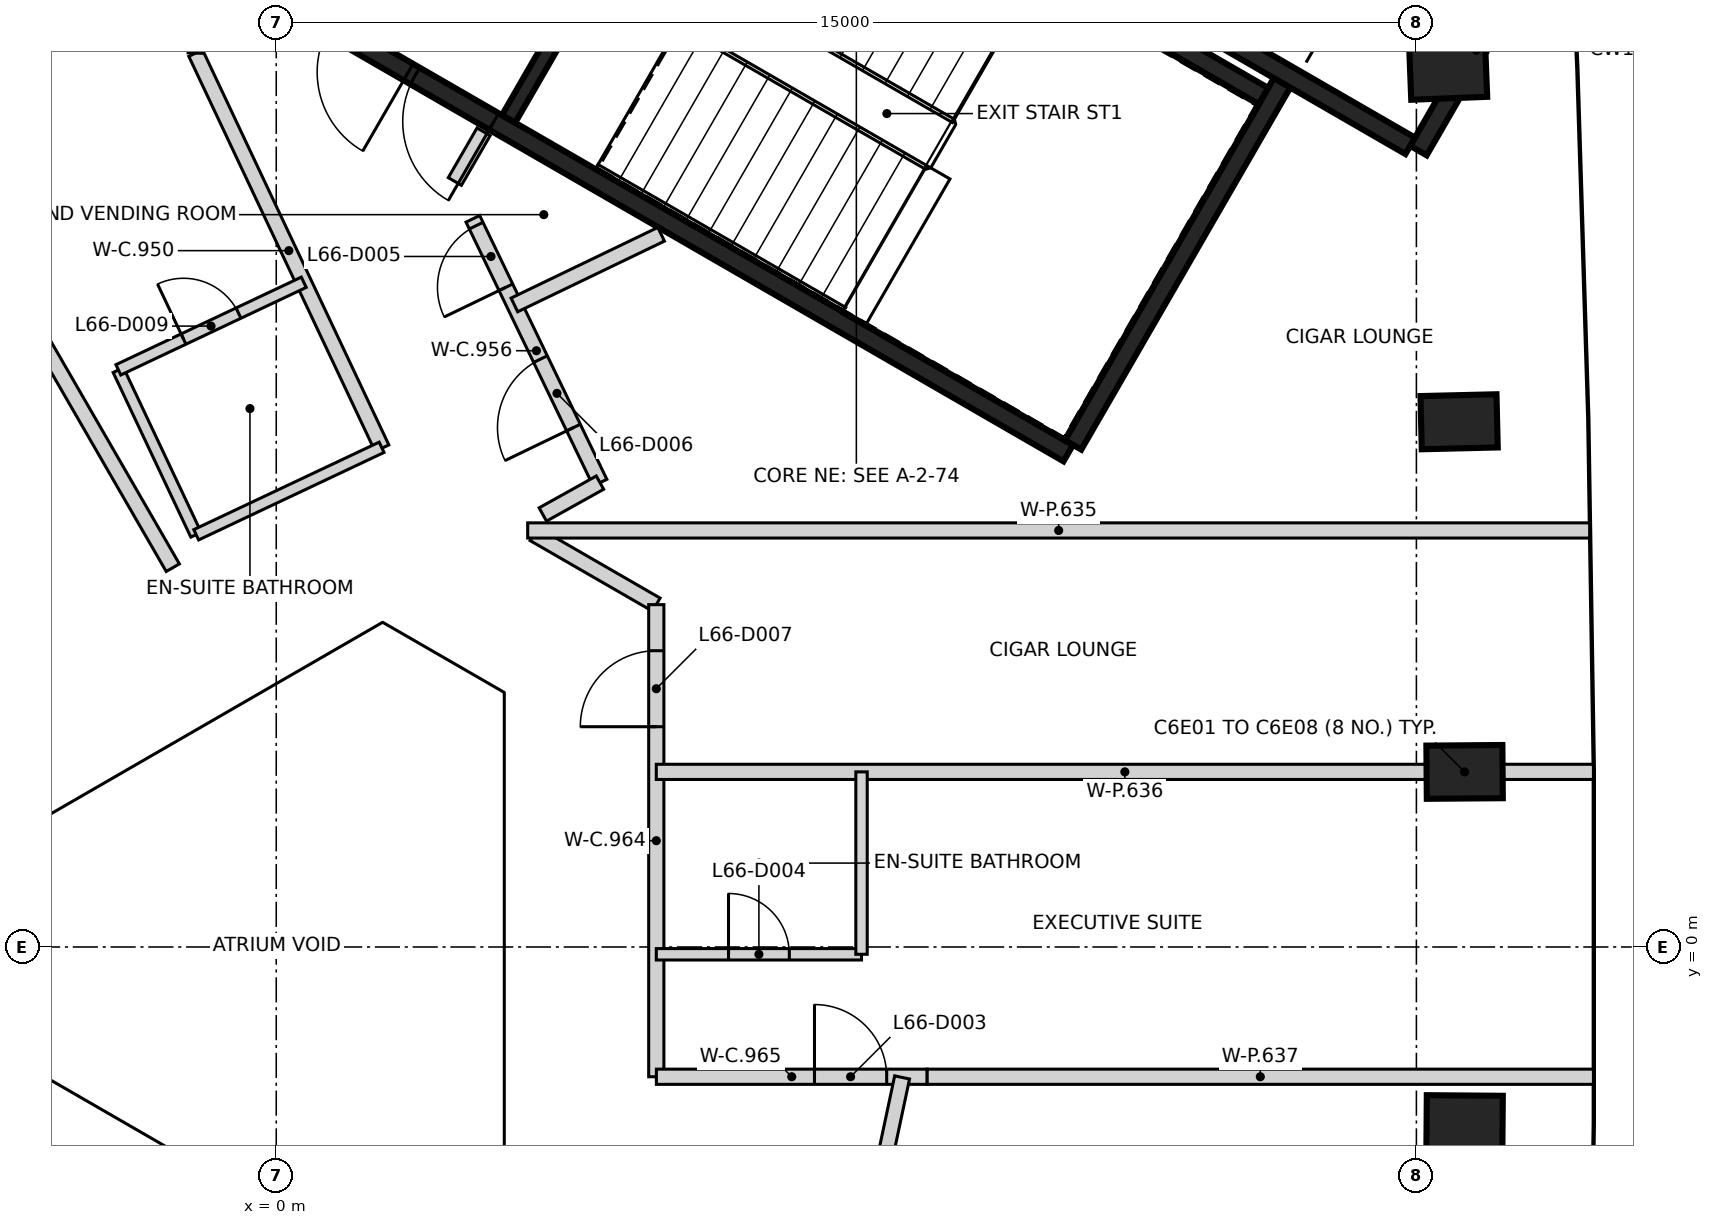
"""IFC4 building model, lengths in metres.
Left out: names, types, materials, properties, quantities, classifications, styles, units other than length and angle.
Written with IfcOpenShell. Run it as: python <this file> out.ifc"""

import sys

from ifc_helpers import new_model, si_unit, direction, frame, frame_2d, origin, origin_2d, place, context, subcontext, project, spatial, rectangle, extrude, element, fill, save


model = new_model("IFC4")
c1 = context("Model", 3, precision=1e-05, world=origin(), true_north=direction((0.0, 1.0)))
c2 = subcontext(c1, "Body", "Model", "MODEL_VIEW")
j1 = project(units=[si_unit("LENGTHUNIT", "METRE"), si_unit("PLANEANGLEUNIT", "RADIAN")], contexts=[c1])
p1 = place(None, origin())
s1 = spatial("IfcSite", under=j1, at=p1, CompositionType="ELEMENT")
p2 = place(p1, origin())
s2 = spatial("IfcBuilding", under=s1, at=p2, CompositionType="ELEMENT")
p3 = place(p2, frame((0.0, 0.0, 262.2)))
s3 = spatial("IfcBuildingStorey", under=s2, at=p3, CompositionType="ELEMENT", Elevation=262.2)
for number, where, z_axis, x_axis in (
    (1, (15.634, -2.303, -0.35), (0.0, 0.0, 1.0), (-1.0, 0.008, 0.0)),
    (2, (15.634, 2.303, -0.35), (0.0, 0.0, 1.0), (1.0, 0.008, 0.0)),
    (3, (15.562, 6.91, -0.35), (0.0, 0.0, 1.0), (1.0, 0.024, 0.0)),
    (4, (15.418, 11.515, -0.35), (0.0, 0.0, 1.0), (0.999, 0.039, 0.0)),
):
    element("IfcColumn", number, at=place(p3, frame(where, z_axis=z_axis, x_axis=x_axis)), inside=s3, PredefinedType="COLUMN", context=c2, shape_type="SweptSolid", body=[
        extrude(rectangle(XDim=1.0, YDim=0.7, at=origin_2d()), origin(), (0.0, 0.0, 1.0), 3.6),
    ])
p4 = place(p3, frame((10.42, 6.498, 0.0), z_axis=(0.0, 0.0, 1.0), x_axis=(-0.866021906294, 0.500006057782, 0.0)))
e5 = element("IfcWall", 5, at=p4, inside=s3, PredefinedType="SHEAR", context=c2, shape_type="SweptSolid", body=[
    extrude(rectangle(XDim=11.55, YDim=0.25, at=frame_2d((5.775, 0.0))), origin(), (0.0, 0.0, 1.0), 3.25),
])
p5 = place(p4, frame((10.025, 0.0, 0.0)))
e6 = element("IfcOpeningElement", 6, at=p5, cuts=e5, PredefinedType="OPENING", context=c2, shape_type="SweptSolid", body=[
    extrude(rectangle(XDim=1.2, YDim=2.1, at=frame_2d((0.6, 1.05))), frame((0.0, 0.135, 0.0), z_axis=(0.0, -1.0, 0.0), x_axis=(1.0, 0.0, 0.0)), (0.0, 0.0, 1.0), 0.27),
])
p6 = place(p4, frame((8.725, 0.0, 0.0)))
e7 = element("IfcOpeningElement", 7, at=p6, cuts=e5, PredefinedType="OPENING", context=c2, shape_type="SweptSolid", body=[
    extrude(rectangle(XDim=1.2, YDim=2.1, at=frame_2d((0.6, 1.05))), frame((0.0, 0.135, 0.0), z_axis=(0.0, -1.0, 0.0), x_axis=(1.0, 0.0, 0.0)), (0.0, 0.0, 1.0), 0.27),
])
p7 = place(p3, frame((13.238, 11.378, 0.0), z_axis=(0.0, 0.0, 1.0), x_axis=(-0.500008851346, -0.866020293397, 0.0)))
e8 = element("IfcWall", 8, at=p7, inside=s3, PredefinedType="SHEAR", context=c2, shape_type="SweptSolid", body=[
    extrude(rectangle(XDim=5.51, YDim=0.25, at=frame_2d((2.755, 0.0))), origin(), (0.0, 0.0, 1.0), 3.25),
])
p8 = place(p3, frame((16.552, 13.119, 0.0), z_axis=(0.0, 0.0, 1.0), x_axis=(-0.499978833458, -0.866037623948, 0.0)))
e9 = element("IfcWall", 9, at=p8, inside=s3, PredefinedType="SHEAR", context=c2, shape_type="SweptSolid", body=[
    extrude(rectangle(XDim=3.05, YDim=0.25, at=frame_2d((1.525, 0.0))), origin(), (0.0, 0.0, 1.0), 3.25),
])
p9 = place(p3, frame((14.918, 10.54, 0.0), z_axis=(0.0, 0.0, 1.0), x_axis=(-0.866063538972, 0.499933942099, 0.0)))
e10 = element("IfcWall", 10, at=p9, inside=s3, PredefinedType="SHEAR", context=c2, shape_type="SweptSolid", body=[
    extrude(rectangle(XDim=2.865, YDim=0.25, at=frame_2d((1.432, 0.0))), origin(), (0.0, 0.0, 1.0), 3.25),
])
p10 = place(p3, frame((10.757, 12.481, 0.0), z_axis=(0.0, 0.0, 1.0), x_axis=(0.866022940537, -0.500004266446, 0.0)))
e11 = element("IfcWall", 11, at=p10, inside=s3, PredefinedType="SHEAR", context=c2, shape_type="SweptSolid", body=[
    extrude(rectangle(XDim=2.575, YDim=0.25, at=frame_2d((1.287, 0.0))), origin(), (0.0, 0.0, 1.0), 3.25),
])
p11 = place(p3, frame((3.057, 10.895, 0.0), z_axis=(0.0, 0.0, 1.0), x_axis=(0.500027839223, 0.866009330205, 0.0)))
e12 = element("IfcWall", 12, at=p11, inside=s3, PredefinedType="SHEAR", context=c2, shape_type="SweptSolid", body=[
    extrude(rectangle(XDim=5.098, YDim=0.2, at=frame_2d((2.549, 0.0))), origin(), (0.0, 0.0, 1.0), 3.25),
])
p12 = place(p11, frame((1.774, 0.0, 0.0)))
e13 = element("IfcOpeningElement", 13, at=p12, cuts=e12, PredefinedType="OPENING", context=c2, shape_type="SweptSolid", body=[
    extrude(rectangle(XDim=1.4, YDim=2.1, at=frame_2d((0.7, 1.05))), frame((0.0, 0.11, 0.0), z_axis=(0.0, -1.0, 0.0), x_axis=(1.0, 0.0, 0.0)), (0.0, 0.0, 1.0), 0.22),
])
p13 = place(p3, frame((-6.356, -2.103, 0.0), z_axis=(0.0, 0.0, 1.0), x_axis=(0.865939059902, -0.50014952218, 0.0)))
e14 = element("IfcWall", 14, at=p13, inside=s3, PredefinedType="PARTITIONING", context=c2, shape_type="SweptSolid", body=[
    extrude(rectangle(XDim=8.956, YDim=0.2, at=frame_2d((4.478, 0.0))), origin(), (0.0, 0.0, 1.0), 3.25),
])
p14 = place(p13, frame((4.546, 0.0, 0.0)))
e15 = element("IfcOpeningElement", 15, at=p14, cuts=e14, PredefinedType="OPENING", context=c2, shape_type="SweptSolid", body=[
    extrude(rectangle(XDim=1.0, YDim=2.1, at=frame_2d((0.5, 1.05))), frame((0.0, 0.11, 0.0), z_axis=(0.0, -1.0, 0.0), x_axis=(1.0, 0.0, 0.0)), (0.0, 0.0, 1.0), 0.22),
])
p15 = place(p13, frame((7.275, 0.0, 0.0)))
e16 = element("IfcOpeningElement", 16, at=p15, cuts=e14, PredefinedType="OPENING", context=c2, shape_type="SweptSolid", body=[
    extrude(rectangle(XDim=1.0, YDim=2.1, at=frame_2d((0.5, 1.05))), frame((0.0, 0.11, 0.0), z_axis=(0.0, -1.0, 0.0), x_axis=(1.0, 0.0, 0.0)), (0.0, 0.0, 1.0), 0.22),
])
p16 = place(p3, frame((-1.06, 11.76, 0.0), z_axis=(0.0, 0.0, 1.0), x_axis=(0.426549824954, -0.904464066081, 0.0)))
e17 = element("IfcWall", 17, at=p16, inside=s3, PredefinedType="PARTITIONING", context=c2, shape_type="SweptSolid", body=[
    extrude(rectangle(XDim=5.747, YDim=0.2, at=frame_2d((2.873, 0.0))), origin(), (0.0, 0.0, 1.0), 3.25),
])
p17 = place(p3, frame((-1.06, 11.76, 0.0), z_axis=(0.0, 0.0, 1.0), x_axis=(0.032059906789, 0.999485949064, 0.0)))
e18 = element("IfcWall", 18, at=p17, inside=s3, PredefinedType="PARTITIONING", context=c2, shape_type="SweptSolid", body=[
    extrude(rectangle(XDim=0.998, YDim=0.2, at=frame_2d((0.499, 0.0))), origin(), (0.0, 0.0, 1.0), 3.25),
])
p18 = place(p3, frame((2.35, 10.071, 0.0), z_axis=(0.0, 0.0, 1.0), x_axis=(0.500309905322, 0.865846405916, 0.0)))
e19 = element("IfcWall", 19, at=p18, inside=s3, PredefinedType="PARTITIONING", context=c2, shape_type="SweptSolid", body=[
    extrude(rectangle(XDim=0.755, YDim=0.2, at=frame_2d((0.378, 0.0))), origin(), (0.0, 0.0, 1.0), 3.25),
])
p19 = place(p3, frame((4.26, 6.109, 0.0), z_axis=(0.0, 0.0, 1.0), x_axis=(-0.434189007872, 0.900821794498, 0.0)))
e20 = element("IfcWall", 20, at=p19, inside=s3, PredefinedType="PARTITIONING", context=c2, shape_type="SweptSolid", body=[
    extrude(rectangle(XDim=3.853, YDim=0.2, at=frame_2d((1.926, 0.0))), origin(), (0.0, 0.0, 1.0), 3.25),
])
p20 = place(p19, frame((2.853, 0.0, 0.0)))
e21 = element("IfcOpeningElement", 21, at=p20, cuts=e20, PredefinedType="OPENING", context=c2, shape_type="SweptSolid", body=[
    extrude(rectangle(XDim=0.9, YDim=2.1, at=frame_2d((0.45, 1.05))), frame((0.0, 0.11, 0.0), z_axis=(0.0, -1.0, 0.0), x_axis=(1.0, 0.0, 0.0)), (0.0, 0.0, 1.0), 0.22),
])
p21 = place(p19, frame((0.804, 0.0, 0.0)))
e22 = element("IfcOpeningElement", 22, at=p21, cuts=e20, PredefinedType="OPENING", context=c2, shape_type="SweptSolid", body=[
    extrude(rectangle(XDim=1.0, YDim=2.1, at=frame_2d((0.5, 1.05))), frame((0.0, 0.11, 0.0), z_axis=(0.0, -1.0, 0.0), x_axis=(1.0, 0.0, 0.0)), (0.0, 0.0, 1.0), 0.22),
])
p22 = place(p3, frame((3.39, 5.433, 0.0), z_axis=(0.0, 0.0, 1.0), x_axis=(0.866117799835, -0.499839931186, 0.0)))
e23 = element("IfcWall", 23, at=p22, inside=s3, PredefinedType="PARTITIONING", context=c2, shape_type="SweptSolid", body=[
    extrude(rectangle(XDim=1.859, YDim=0.2, at=frame_2d((0.929, 0.0))), origin(), (0.0, 0.0, 1.0), 3.25),
])
p23 = place(p3, frame((3.507, 5.69, 0.0), z_axis=(0.0, 0.0, 1.0), x_axis=(0.873567976284, 0.486702158215, 0.0)))
e24 = element("IfcWall", 24, at=p23, inside=s3, PredefinedType="PARTITIONING", context=c2, shape_type="SweptSolid", body=[
    extrude(rectangle(XDim=0.861, YDim=0.2, at=frame_2d((0.43, 0.0))), origin(), (0.0, 0.0, 1.0), 3.25),
])
p24 = place(p3, frame((5.0, -1.707, 0.0), z_axis=(0.0, 0.0, 1.0), x_axis=(0.0, 1.0, 0.0)))
e25 = element("IfcWall", 25, at=p24, inside=s3, PredefinedType="PARTITIONING", context=c2, shape_type="SweptSolid", body=[
    extrude(rectangle(XDim=6.211, YDim=0.2, at=frame_2d((3.105, 0.0))), origin(), (0.0, 0.0, 1.0), 3.25),
])
p25 = place(p24, frame((4.605, 0.0, 0.0)))
e26 = element("IfcOpeningElement", 26, at=p25, cuts=e25, PredefinedType="OPENING", context=c2, shape_type="SweptSolid", body=[
    extrude(rectangle(XDim=1.0, YDim=2.1, at=frame_2d((0.5, 1.05))), frame((0.0, 0.11, 0.0), z_axis=(0.0, -1.0, 0.0), x_axis=(1.0, 0.0, 0.0)), (0.0, 0.0, 1.0), 0.22),
])
p26 = place(p3, frame((5.001, -1.707, 0.0), z_axis=(0.0, 0.0, 1.0), x_axis=(1.0, 0.0, 0.0)))
e27 = element("IfcWall", 27, at=p26, inside=s3, PredefinedType="PARTITIONING", context=c2, shape_type="SweptSolid", body=[
    extrude(rectangle(XDim=3.562, YDim=0.2, at=frame_2d((1.781, 0.0))), origin(), (0.0, 0.0, 1.0), 3.25),
])
p27 = place(p26, frame((2.08, 0.0, 0.0)))
e28 = element("IfcOpeningElement", 28, at=p27, cuts=e27, PredefinedType="OPENING", context=c2, shape_type="SweptSolid", body=[
    extrude(rectangle(XDim=0.95, YDim=2.1, at=frame_2d((0.475, 1.05))), frame((0.0, 0.11, 0.0), z_axis=(0.0, -1.0, 0.0), x_axis=(1.0, 0.0, 0.0)), (0.0, 0.0, 1.0), 0.22),
])
p28 = place(p3, frame((7.673, -4.354, 0.0), z_axis=(0.0, 0.0, 1.0), x_axis=(0.207939957157, 0.978141592111, 0.0)))
e29 = element("IfcWall", 29, at=p28, inside=s3, PredefinedType="PARTITIONING", context=c2, shape_type="SweptSolid", body=[
    extrude(rectangle(XDim=2.697, YDim=0.2, at=frame_2d((1.348, 0.0))), origin(), (0.0, 0.0, 1.0), 3.25),
])
p29 = place(p3, frame((-7.524, 15.666, 0.0), z_axis=(0.0, 0.0, 1.0), x_axis=(0.499979611936, -0.866037174519, 0.0)))
e30 = element("IfcWall", 30, at=p29, inside=s3, PredefinedType="PARTITIONING", context=c2, shape_type="SweptSolid", body=[
    extrude(rectangle(XDim=12.327, YDim=0.2, at=frame_2d((6.164, 0.0))), origin(), (0.0, 0.0, 1.0), 2.35),
])
p30 = place(p3, frame((3.133, 8.447, 0.0), z_axis=(0.0, 0.0, 1.0), x_axis=(0.900981876458, 0.433856725538, 0.0)))
e31 = element("IfcWall", 31, at=p30, inside=s3, PredefinedType="PARTITIONING", context=c2, shape_type="SweptSolid", body=[
    extrude(rectangle(XDim=2.143, YDim=0.2, at=frame_2d((1.071, 0.0))), origin(), (0.0, 0.0, 1.0), 3.25),
])
p31 = place(p3, frame((3.308, 5.48, 0.0), z_axis=(0.0, 0.0, 1.0), x_axis=(1.0, 0.0, 0.0)))
e32 = element("IfcWall", 32, at=p31, inside=s3, PredefinedType="PARTITIONING", context=c2, shape_type="SweptSolid", body=[
    extrude(rectangle(XDim=13.971, YDim=0.2, at=frame_2d((6.986, 0.0))), origin(), (0.0, 0.0, 1.0), 2.35),
])
p32 = place(p3, frame((5.0, 2.304, 0.0), z_axis=(0.0, 0.0, 1.0), x_axis=(1.0, 0.0, 0.0)))
e33 = element("IfcWall", 33, at=p32, inside=s3, PredefinedType="PARTITIONING", context=c2, shape_type="SweptSolid", body=[
    extrude(rectangle(XDim=12.329, YDim=0.2, at=frame_2d((6.165, 0.0))), origin(), (0.0, 0.0, 1.0), 3.25),
])
p33 = place(p3, frame((8.564, -1.707, 0.0), z_axis=(0.0, 0.0, 1.0), x_axis=(1.0, 0.0, 0.0)))
e34 = element("IfcWall", 34, at=p33, inside=s3, PredefinedType="PARTITIONING", context=c2, shape_type="SweptSolid", body=[
    extrude(rectangle(XDim=8.765, YDim=0.2, at=frame_2d((4.383, 0.0))), origin(), (0.0, 0.0, 1.0), 2.35),
])
p34 = place(p3, frame((-2.078, 7.59, 0.0), z_axis=(0.0, 0.0, 1.0), x_axis=(0.426709924428, -0.904388545037, 0.0)))
e35 = element("IfcWall", 35, at=p34, inside=s3, PredefinedType="PARTITIONING", context=c2, shape_type="SweptSolid", body=[
    extrude(rectangle(XDim=2.395, YDim=0.15, at=frame_2d((1.198, 0.0))), origin(), (0.0, 0.0, 1.0), 3.25),
])
p35 = place(p3, frame((-2.077, 7.593, 0.0), z_axis=(0.0, 0.0, 1.0), x_axis=(0.904196218291, 0.427117312724, 0.0)))
e36 = element("IfcWall", 36, at=p35, inside=s3, PredefinedType="PARTITIONING", context=c2, shape_type="SweptSolid", body=[
    extrude(rectangle(XDim=2.697, YDim=0.15, at=frame_2d((1.349, 0.0))), origin(), (0.0, 0.0, 1.0), 3.25),
])
p36 = place(p35, frame((0.948, 0.0, 0.0)))
e37 = element("IfcOpeningElement", 37, at=p36, cuts=e36, PredefinedType="OPENING", context=c2, shape_type="SweptSolid", body=[
    extrude(rectangle(XDim=0.8, YDim=2.1, at=frame_2d((0.4, 1.05))), frame((0.0, 0.085, 0.0), z_axis=(0.0, -1.0, 0.0), x_axis=(1.0, 0.0, 0.0)), (0.0, 0.0, 1.0), 0.17),
])
p37 = place(p3, frame((-1.053, 5.423, 0.0), z_axis=(0.0, 0.0, 1.0), x_axis=(0.904370950432, 0.426747213247, 0.0)))
e38 = element("IfcWall", 38, at=p37, inside=s3, PredefinedType="PARTITIONING", context=c2, shape_type="SweptSolid", body=[
    extrude(rectangle(XDim=2.697, YDim=0.15, at=frame_2d((1.348, 0.0))), origin(), (0.0, 0.0, 1.0), 3.25),
])
p38 = place(p3, frame((5.0, -0.096, 0.0), z_axis=(0.0, 0.0, 1.0), x_axis=(1.0, 0.0, 0.0)))
e39 = element("IfcWall", 39, at=p38, inside=s3, PredefinedType="PARTITIONING", context=c2, shape_type="SweptSolid", body=[
    extrude(rectangle(XDim=2.7, YDim=0.15, at=frame_2d((1.35, 0.0))), origin(), (0.0, 0.0, 1.0), 3.25),
])
p39 = place(p38, frame((0.95, 0.0, 0.0)))
e40 = element("IfcOpeningElement", 40, at=p39, cuts=e39, PredefinedType="OPENING", context=c2, shape_type="SweptSolid", body=[
    extrude(rectangle(XDim=0.8, YDim=2.1, at=frame_2d((0.4, 1.05))), frame((0.0, 0.085, 0.0), z_axis=(0.0, -1.0, 0.0), x_axis=(1.0, 0.0, 0.0)), (0.0, 0.0, 1.0), 0.17),
])
p40 = place(p3, frame((7.7, -0.096, 0.0), z_axis=(0.0, 0.0, 1.0), x_axis=(0.0, 1.0, 0.0)))
e41 = element("IfcWall", 41, at=p40, inside=s3, PredefinedType="PARTITIONING", context=c2, shape_type="SweptSolid", body=[
    extrude(rectangle(XDim=2.4, YDim=0.15, at=frame_2d((1.2, 0.0))), origin(), (0.0, 0.0, 1.0), 3.25),
])
p41 = place(p3, frame((0.0, 0.0, -0.35)))
p42 = place(p41, origin())
p43 = place(p42, frame((0.0, 0.0, 0.3)))
e42 = element("IfcWindow", 42, at=p43, inside=s3, PartitioningType="SINGLE_PANEL", PredefinedType="SKYLIGHT", context=c2, shape_type="SweptSolid", body=[
    extrude(rectangle(XDim=4.88, YDim=3.04, at=origin_2d()), origin(), (0.0, 0.0, 1.0), 0.05),
])
p44 = place(p5, origin())
e43 = element("IfcDoor", 43, at=p44, inside=s3, OperationType="SINGLE_SWING_LEFT", PredefinedType="DOOR", context=c2, shape_type="SweptSolid", body=[
    extrude(rectangle(XDim=1.2, YDim=2.1, at=frame_2d((0.6, 1.05))), frame((0.0, 0.025, 0.0), z_axis=(0.0, -1.0, 0.0), x_axis=(1.0, 0.0, 0.0)), (0.0, 0.0, 1.0), 0.05),
])
fill(e6, e43)
p45 = place(p6, origin())
e44 = element("IfcDoor", 44, at=p45, inside=s3, OperationType="SINGLE_SWING_RIGHT", PredefinedType="DOOR", context=c2, shape_type="SweptSolid", body=[
    extrude(rectangle(XDim=1.2, YDim=2.1, at=frame_2d((0.6, 1.05))), frame((0.0, 0.025, 0.0), z_axis=(0.0, -1.0, 0.0), x_axis=(1.0, 0.0, 0.0)), (0.0, 0.0, 1.0), 0.05),
])
fill(e7, e44)
p46 = place(p27, origin())
e45 = element("IfcDoor", 45, at=p46, inside=s3, OperationType="SINGLE_SWING_LEFT", PredefinedType="DOOR", context=c2, shape_type="SweptSolid", body=[
    extrude(rectangle(XDim=0.95, YDim=2.1, at=frame_2d((0.475, 1.05))), frame((0.0, 0.025, 0.0), z_axis=(0.0, -1.0, 0.0), x_axis=(1.0, 0.0, 0.0)), (0.0, 0.0, 1.0), 0.05),
])
fill(e28, e45)
p47 = place(p39, origin())
e46 = element("IfcDoor", 46, at=p47, inside=s3, OperationType="SINGLE_SWING_LEFT", PredefinedType="DOOR", context=c2, shape_type="SweptSolid", body=[
    extrude(rectangle(XDim=0.8, YDim=2.1, at=frame_2d((0.4, 1.05))), frame((0.0, 0.025, 0.0), z_axis=(0.0, -1.0, 0.0), x_axis=(1.0, 0.0, 0.0)), (0.0, 0.0, 1.0), 0.05),
])
fill(e40, e46)
p48 = place(p20, origin())
e47 = element("IfcDoor", 47, at=p48, inside=s3, OperationType="SINGLE_SWING_LEFT", PredefinedType="DOOR", context=c2, shape_type="SweptSolid", body=[
    extrude(rectangle(XDim=0.9, YDim=2.1, at=frame_2d((0.45, 1.05))), frame((0.0, 0.025, 0.0), z_axis=(0.0, -1.0, 0.0), x_axis=(1.0, 0.0, 0.0)), (0.0, 0.0, 1.0), 0.05),
])
fill(e21, e47)
p49 = place(p21, origin())
e48 = element("IfcDoor", 48, at=p49, inside=s3, OperationType="SINGLE_SWING_LEFT", PredefinedType="DOOR", context=c2, shape_type="SweptSolid", body=[
    extrude(rectangle(XDim=1.0, YDim=2.1, at=frame_2d((0.5, 1.05))), frame((0.0, 0.025, 0.0), z_axis=(0.0, -1.0, 0.0), x_axis=(1.0, 0.0, 0.0)), (0.0, 0.0, 1.0), 0.05),
])
fill(e22, e48)
p50 = place(p25, frame((1.0, 0.0, 0.0), z_axis=(0.0, 0.0, 1.0), x_axis=(-1.0, 0.0, 0.0)))
e49 = element("IfcDoor", 49, at=p50, inside=s3, OperationType="SINGLE_SWING_LEFT", PredefinedType="DOOR", context=c2, shape_type="SweptSolid", body=[
    extrude(rectangle(XDim=1.0, YDim=2.1, at=frame_2d((0.5, 1.05))), frame((0.0, 0.025, 0.0), z_axis=(0.0, -1.0, 0.0), x_axis=(1.0, 0.0, 0.0)), (0.0, 0.0, 1.0), 0.05),
])
fill(e26, e49)
p51 = place(p36, origin())
e50 = element("IfcDoor", 50, at=p51, inside=s3, OperationType="SINGLE_SWING_LEFT", PredefinedType="DOOR", context=c2, shape_type="SweptSolid", body=[
    extrude(rectangle(XDim=0.8, YDim=2.1, at=frame_2d((0.4, 1.05))), frame((0.0, 0.025, 0.0), z_axis=(0.0, -1.0, 0.0), x_axis=(1.0, 0.0, 0.0)), (0.0, 0.0, 1.0), 0.05),
])
fill(e37, e50)
save(model, sys.argv[1])
